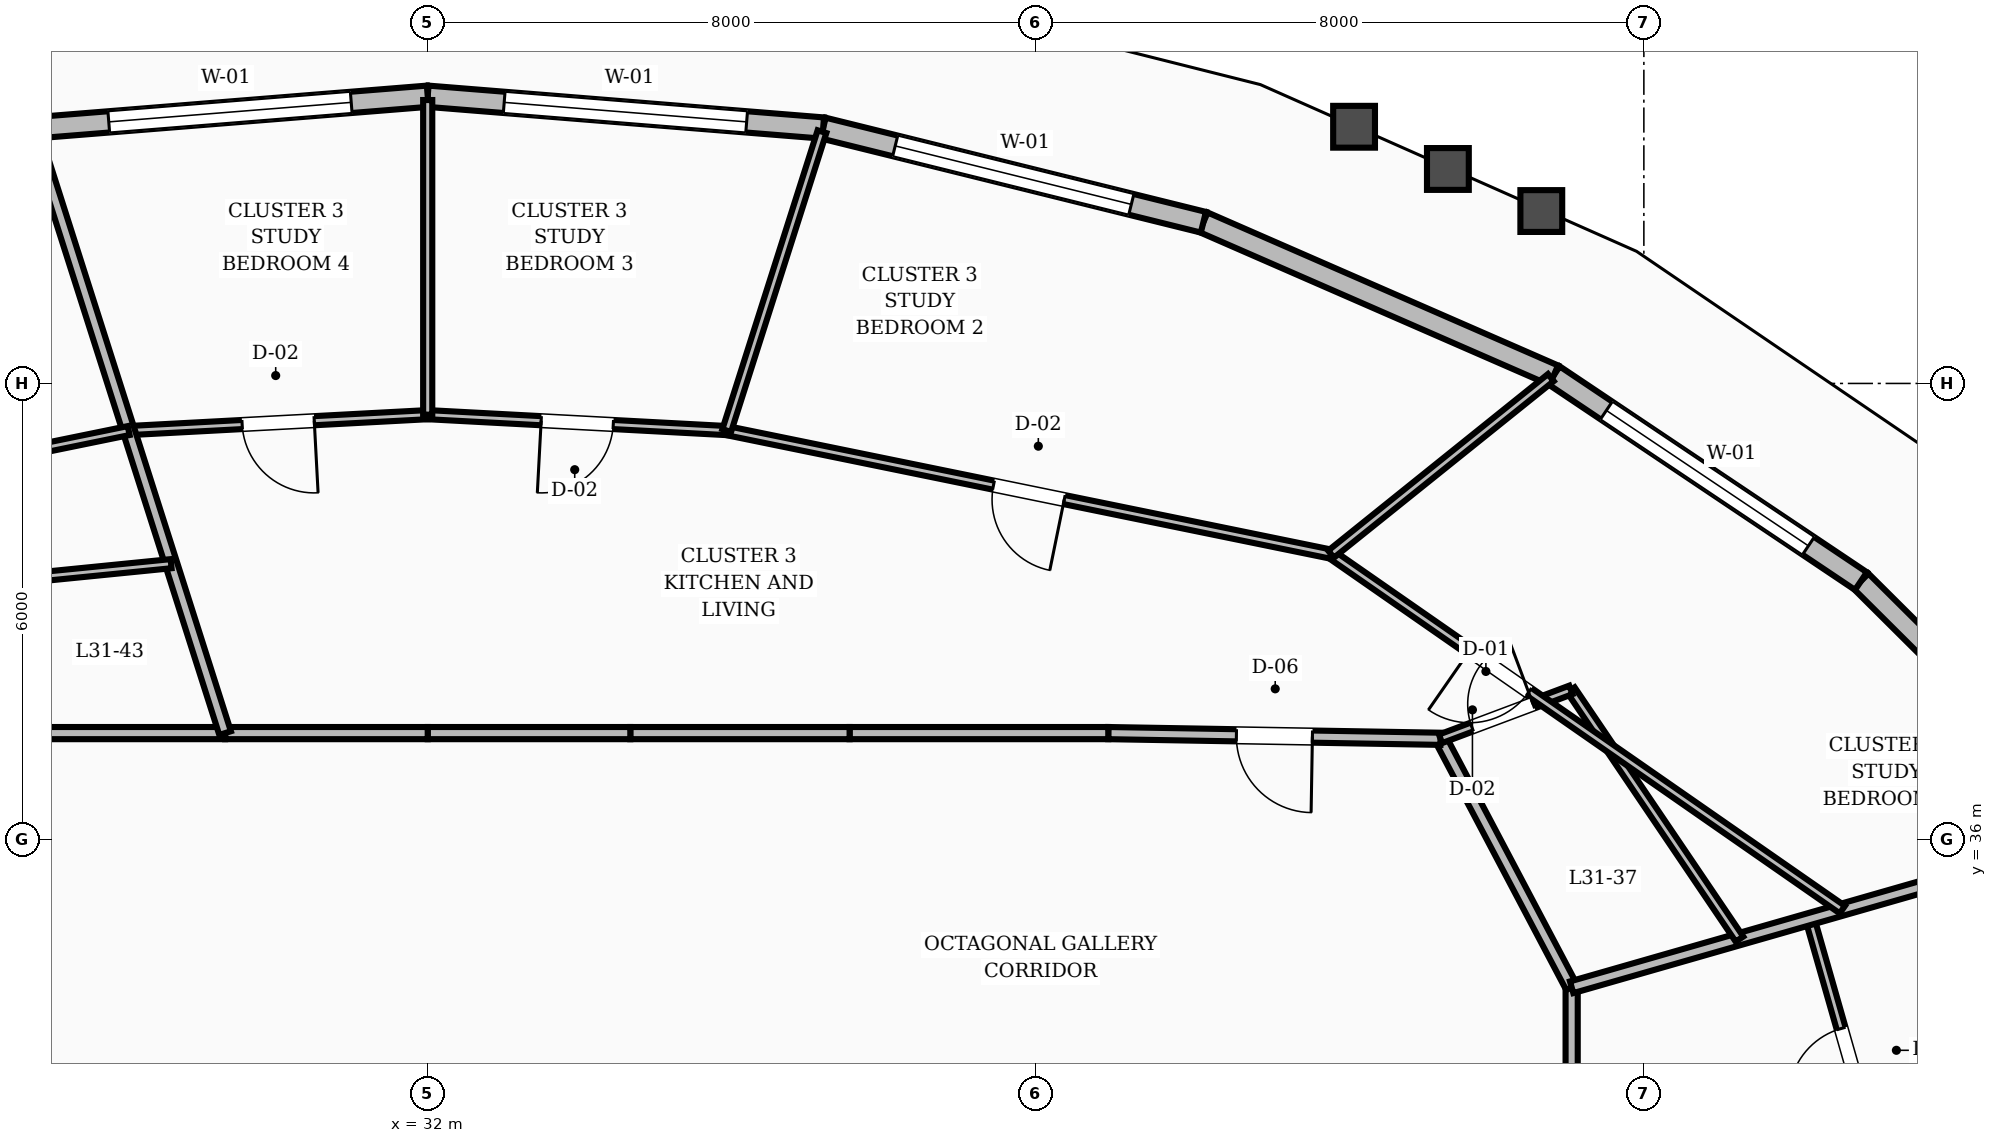
"""IFC4 building model, lengths in metres.
Left out: names, types, materials, properties, quantities, classifications, styles, units other than length and angle.
Written with IfcOpenShell. Run it as: python <this file> out.ifc"""

import sys

from ifc_helpers import new_model, si_unit, direction, frame, frame_2d, origin, place, context, subcontext, project, spatial, rectangle, extrude, element, fill, save


model = new_model("IFC4")
c1 = context("Model", 3, precision=1e-05, world=origin(), true_north=direction((0.0, 1.0)))
c2 = subcontext(c1, "Body", "Model", "MODEL_VIEW")
j1 = project(units=[si_unit("LENGTHUNIT", "METRE"), si_unit("PLANEANGLEUNIT", "RADIAN")], contexts=[c1])
p1 = place(None, origin())
s1 = spatial("IfcSite", under=j1, at=p1, CompositionType="ELEMENT")
p2 = place(p1, origin())
s2 = spatial("IfcBuilding", under=s1, at=p2, CompositionType="ELEMENT")
p3 = place(p2, frame((0.0, 0.0, 124.4)))
s3 = spatial("IfcBuildingStorey", under=s2, at=p3, CompositionType="ELEMENT", Elevation=124.4)
p4 = place(p3, frame((54.173, 36.1, 0.0), z_axis=(0.0, 0.0, 1.0), x_axis=(-0.708826657364, 0.70538271159, 0.0)))
e1 = element("IfcWall", 1, at=p4, inside=s3, PredefinedType="STANDARD", context=c2, shape_type="SweptSolid", body=[
    extrude(rectangle(XDim=4.679, YDim=0.28, at=frame_2d((2.339, 0.0))), origin(), (0.0, 0.0, 1.0), 2.82),
])
p5 = place(p3, frame((50.856, 39.4, 0.0), z_axis=(0.0, 0.0, 1.0), x_axis=(-0.83069663506, 0.556725336679, 0.0)))
e2 = element("IfcWall", 2, at=p5, inside=s3, PredefinedType="STANDARD", context=c2, shape_type="SweptSolid", body=[
    extrude(rectangle(XDim=4.865, YDim=0.28, at=frame_2d((2.432, 0.0))), origin(), (0.0, 0.0, 1.0), 2.82),
])
p6 = place(p5, frame((0.832, 0.0, 0.8)))
e3 = element("IfcOpeningElement", 3, at=p6, cuts=e2, PredefinedType="OPENING", context=c2, shape_type="SweptSolid", body=[
    extrude(rectangle(XDim=3.2, YDim=1.65, at=frame_2d((1.6, 0.825))), frame((0.0, 0.15, 0.0), z_axis=(0.0, -1.0, 0.0), x_axis=(1.0, 0.0, 0.0)), (0.0, 0.0, 1.0), 0.3),
])
p7 = place(p3, frame((46.815, 42.108, 0.0), z_axis=(0.0, 0.0, 1.0), x_axis=(-0.916473381058, 0.400095665825, 0.0)))
e4 = element("IfcWall", 4, at=p7, inside=s3, PredefinedType="STANDARD", context=c2, shape_type="SweptSolid", body=[
    extrude(rectangle(XDim=5.031, YDim=0.28, at=frame_2d((2.515, 0.0))), origin(), (0.0, 0.0, 1.0), 2.82),
])
p8 = place(p3, frame((42.205, 44.121, 0.0), z_axis=(0.0, 0.0, 1.0), x_axis=(-0.970658593631, 0.24046183608, 0.0)))
e5 = element("IfcWall", 5, at=p8, inside=s3, PredefinedType="STANDARD", context=c2, shape_type="SweptSolid", body=[
    extrude(rectangle(XDim=5.154, YDim=0.28, at=frame_2d((2.577, 0.0))), origin(), (0.0, 0.0, 1.0), 2.82),
])
p9 = place(p8, frame((0.977, 0.0, 0.8)))
e6 = element("IfcOpeningElement", 6, at=p9, cuts=e5, PredefinedType="OPENING", context=c2, shape_type="SweptSolid", body=[
    extrude(rectangle(XDim=3.2, YDim=1.65, at=frame_2d((1.6, 0.825))), frame((0.0, 0.15, 0.0), z_axis=(0.0, -1.0, 0.0), x_axis=(1.0, 0.0, 0.0)), (0.0, 0.0, 1.0), 0.3),
])
p10 = place(p3, frame((37.202, 45.36, 0.0), z_axis=(0.0, 0.0, 1.0), x_axis=(-0.996780678479, 0.080176549013, 0.0)))
e7 = element("IfcWall", 7, at=p10, inside=s3, PredefinedType="STANDARD", context=c2, shape_type="SweptSolid", body=[
    extrude(rectangle(XDim=5.219, YDim=0.28, at=frame_2d((2.61, 0.0))), origin(), (0.0, 0.0, 1.0), 2.82),
])
p11 = place(p10, frame((1.01, 0.0, 0.8)))
e8 = element("IfcOpeningElement", 8, at=p11, cuts=e7, PredefinedType="OPENING", context=c2, shape_type="SweptSolid", body=[
    extrude(rectangle(XDim=3.2, YDim=1.65, at=frame_2d((1.6, 0.825))), frame((0.0, 0.15, 0.0), z_axis=(0.0, -1.0, 0.0), x_axis=(1.0, 0.0, 0.0)), (0.0, 0.0, 1.0), 0.3),
])
p12 = place(p3, frame((32.0, 45.779, 0.0), z_axis=(0.0, 0.0, 1.0), x_axis=(-0.996780678479, -0.080176549013, 0.0)))
e9 = element("IfcWall", 9, at=p12, inside=s3, PredefinedType="STANDARD", context=c2, shape_type="SweptSolid", body=[
    extrude(rectangle(XDim=5.219, YDim=0.28, at=frame_2d((2.61, 0.0))), origin(), (0.0, 0.0, 1.0), 2.82),
])
p13 = place(p12, frame((1.01, 0.0, 0.8)))
e10 = element("IfcOpeningElement", 10, at=p13, cuts=e9, PredefinedType="OPENING", context=c2, shape_type="SweptSolid", body=[
    extrude(rectangle(XDim=3.2, YDim=1.65, at=frame_2d((1.6, 0.825))), frame((0.0, 0.15, 0.0), z_axis=(0.0, -1.0, 0.0), x_axis=(1.0, 0.0, 0.0)), (0.0, 0.0, 1.0), 0.3),
])
p14 = place(p3, frame((47.05, 30.234, 0.0), z_axis=(0.0, 0.0, 1.0), x_axis=(0.0, 1.0, 0.0)))
e11 = element("IfcWall", 11, at=p14, inside=s3, PredefinedType="SOLIDWALL", context=c2, shape_type="SweptSolid", body=[
    extrude(rectangle(XDim=3.822, YDim=0.16, at=frame_2d((1.911, 0.0))), origin(), (0.0, 0.0, 1.0), 2.8),
])
p15 = place(p3, frame((47.05, 34.056, 0.0), z_axis=(0.0, 0.0, 1.0), x_axis=(-0.466737093093, 0.884396113702, 0.0)))
e12 = element("IfcWall", 12, at=p15, inside=s3, PredefinedType="SOLIDWALL", context=c2, shape_type="SweptSolid", body=[
    extrude(rectangle(XDim=3.696, YDim=0.16, at=frame_2d((1.848, 0.0))), origin(), (0.0, 0.0, 1.0), 2.8),
])
p16 = place(p3, frame((45.325, 37.325, 0.0), z_axis=(0.0, 0.0, 1.0), x_axis=(-0.999853038912, 0.017143528788, 0.0)))
e13 = element("IfcWall", 13, at=p16, inside=s3, PredefinedType="SOLIDWALL", context=c2, shape_type="SweptSolid", body=[
    extrude(rectangle(XDim=4.372, YDim=0.16, at=frame_2d((2.186, 0.0))), origin(), (0.0, 0.0, 1.0), 2.8),
])
p17 = place(p16, frame((1.686, 0.0, 0.0)))
e14 = element("IfcOpeningElement", 14, at=p17, cuts=e13, PredefinedType="OPENING", context=c2, shape_type="SweptSolid", body=[
    extrude(rectangle(XDim=1.0, YDim=2.1, at=frame_2d((0.5, 1.05))), frame((0.0, 0.09, 0.0), z_axis=(0.0, -1.0, 0.0), x_axis=(1.0, 0.0, 0.0)), (0.0, 0.0, 1.0), 0.18),
])
p18 = place(p3, frame((40.954, 37.4, 0.0), z_axis=(0.0, 0.0, 1.0), x_axis=(-1.0, 0.0, 0.0)))
e15 = element("IfcWall", 15, at=p18, inside=s3, PredefinedType="SOLIDWALL", context=c2, shape_type="SweptSolid", body=[
    extrude(rectangle(XDim=3.403, YDim=0.16, at=frame_2d((1.702, 0.0))), origin(), (0.0, 0.0, 1.0), 2.8),
])
p19 = place(p3, frame((37.551, 37.4, 0.0), z_axis=(0.0, 0.0, 1.0), x_axis=(-1.0, 0.0, 0.0)))
e16 = element("IfcWall", 16, at=p19, inside=s3, PredefinedType="SOLIDWALL", context=c2, shape_type="SweptSolid", body=[
    extrude(rectangle(XDim=2.885, YDim=0.16, at=frame_2d((1.443, 0.0))), origin(), (0.0, 0.0, 1.0), 2.8),
])
for number, where, z_axis, x_axis in (
    (17, (34.665, 37.4, 0.0), (0.0, 0.0, 1.0), (-1.0, 0.0, 0.0)),
    (18, (32.0, 37.4, 0.0), (0.0, 0.0, 1.0), (-1.0, 0.0, 0.0)),
):
    element("IfcWall", number, at=place(p3, frame(where, z_axis=z_axis, x_axis=x_axis)), inside=s3, PredefinedType="SOLIDWALL", context=c2, shape_type="SweptSolid", body=[
        extrude(rectangle(XDim=2.665, YDim=0.16, at=frame_2d((1.333, 0.0))), origin(), (0.0, 0.0, 1.0), 2.8),
    ])
p20 = place(p3, frame((29.335, 37.4, 0.0), z_axis=(0.0, 0.0, 1.0), x_axis=(-1.0, 0.0, 0.0)))
e19 = element("IfcWall", 19, at=p20, inside=s3, PredefinedType="SOLIDWALL", context=c2, shape_type="SweptSolid", body=[
    extrude(rectangle(XDim=2.885, YDim=0.16, at=frame_2d((1.443, 0.0))), origin(), (0.0, 0.0, 1.0), 2.8),
])
p21 = place(p3, frame((51.268, 31.158, 0.0), z_axis=(0.0, 0.0, 1.0), x_axis=(-0.274582301576, 0.961563601465, 0.0)))
e20 = element("IfcWall", 20, at=p21, inside=s3, PredefinedType="PARTITIONING", context=c2, shape_type="SweptSolid", body=[
    extrude(rectangle(XDim=3.949, YDim=0.12, at=frame_2d((1.974, 0.0))), origin(), (0.0, 0.0, 1.0), 2.8),
])
p22 = place(p21, frame((1.5, 0.0, 0.0)))
e21 = element("IfcOpeningElement", 21, at=p22, cuts=e20, PredefinedType="OPENING", context=c2, shape_type="SweptSolid", body=[
    extrude(rectangle(XDim=0.95, YDim=2.1, at=frame_2d((0.475, 1.05))), frame((0.0, 0.07, 0.0), z_axis=(0.0, -1.0, 0.0), x_axis=(1.0, 0.0, 0.0)), (0.0, 0.0, 1.0), 0.14),
])
p23 = place(p3, frame((47.05, 34.056, 0.0), z_axis=(0.0, 0.0, 1.0), x_axis=(0.96122671613, 0.275759315705, 0.0)))
e22 = element("IfcWall", 22, at=p23, inside=s3, PredefinedType="SOLIDWALL", context=c2, shape_type="SweptSolid", body=[
    extrude(rectangle(XDim=7.36, YDim=0.16, at=frame_2d((3.68, 0.0))), origin(), (0.0, 0.0, 1.0), 2.8),
])
p24 = place(p3, frame((49.258, 34.69, 0.0), z_axis=(0.0, 0.0, 1.0), x_axis=(-0.560422606551, 0.828206799095, 0.0)))
e23 = element("IfcWall", 23, at=p24, inside=s3, PredefinedType="PARTITIONING", context=c2, shape_type="SweptSolid", body=[
    extrude(rectangle(XDim=3.959, YDim=0.12, at=frame_2d((1.979, 0.0))), origin(), (0.0, 0.0, 1.0), 2.8),
])
p25 = place(p3, frame((45.325, 37.325, 0.0), z_axis=(0.0, 0.0, 1.0), x_axis=(0.936268898243, 0.351284144507, 0.0)))
e24 = element("IfcWall", 24, at=p25, inside=s3, PredefinedType="PARTITIONING", context=c2, shape_type="SweptSolid", body=[
    extrude(rectangle(XDim=1.831, YDim=0.12, at=frame_2d((0.916, 0.0))), origin(), (0.0, 0.0, 1.0), 2.8),
])
p26 = place(p25, frame((0.44, 0.0, 0.0)))
e25 = element("IfcOpeningElement", 25, at=p26, cuts=e24, PredefinedType="OPENING", context=c2, shape_type="SweptSolid", body=[
    extrude(rectangle(XDim=0.86, YDim=2.1, at=frame_2d((0.43, 1.05))), frame((0.0, 0.07, 0.0), z_axis=(0.0, -1.0, 0.0), x_axis=(1.0, 0.0, 0.0)), (0.0, 0.0, 1.0), 0.14),
])
p27 = place(p3, frame((50.611, 35.078, 0.0), z_axis=(0.0, 0.0, 1.0), x_axis=(-0.821081312211, 0.570811246156, 0.0)))
e26 = element("IfcWall", 26, at=p27, inside=s3, PredefinedType="PARTITIONING", context=c2, shape_type="SweptSolid", body=[
    extrude(rectangle(XDim=8.192, YDim=0.12, at=frame_2d((4.096, 0.0))), origin(), (0.0, 0.0, 1.0), 2.8),
])
p28 = place(p27, frame((5.021, 0.0, 0.0)))
e27 = element("IfcOpeningElement", 27, at=p28, cuts=e26, PredefinedType="OPENING", context=c2, shape_type="SweptSolid", body=[
    extrude(rectangle(XDim=0.95, YDim=2.1, at=frame_2d((0.475, 1.05))), frame((0.0, 0.07, 0.0), z_axis=(0.0, -1.0, 0.0), x_axis=(1.0, 0.0, 0.0)), (0.0, 0.0, 1.0), 0.14),
])
p29 = place(p3, frame((43.885, 39.754, 0.0), z_axis=(0.0, 0.0, 1.0), x_axis=(-0.979728085565, 0.200331920462, 0.0)))
e28 = element("IfcWall", 28, at=p29, inside=s3, PredefinedType="PARTITIONING", context=c2, shape_type="SweptSolid", body=[
    extrude(rectangle(XDim=8.115, YDim=0.12, at=frame_2d((4.058, 0.0))), origin(), (0.0, 0.0, 1.0), 2.8),
])
p30 = place(p29, frame((3.583, 0.0, 0.0)))
e29 = element("IfcOpeningElement", 29, at=p30, cuts=e28, PredefinedType="OPENING", context=c2, shape_type="SweptSolid", body=[
    extrude(rectangle(XDim=0.95, YDim=2.1, at=frame_2d((0.475, 1.05))), frame((0.0, 0.07, 0.0), z_axis=(0.0, -1.0, 0.0), x_axis=(1.0, 0.0, 0.0)), (0.0, 0.0, 1.0), 0.14),
])
p31 = place(p3, frame((43.885, 39.754, 0.0), z_axis=(0.0, 0.0, 1.0), x_axis=(0.779621413821, 0.626251108671, 0.0)))
e30 = element("IfcWall", 30, at=p31, inside=s3, PredefinedType="PARTITIONING", context=c2, shape_type="SweptSolid", body=[
    extrude(rectangle(XDim=3.709, YDim=0.12, at=frame_2d((1.854, 0.0))), origin(), (0.0, 0.0, 1.0), 2.8),
])
p32 = place(p3, frame((35.934, 41.38, 0.0), z_axis=(0.0, 0.0, 1.0), x_axis=(-0.998585283564, 0.0531735973, 0.0)))
e31 = element("IfcWall", 31, at=p32, inside=s3, PredefinedType="PARTITIONING", context=c2, shape_type="SweptSolid", body=[
    extrude(rectangle(XDim=3.939, YDim=0.12, at=frame_2d((1.97, 0.0))), origin(), (0.0, 0.0, 1.0), 2.8),
])
p33 = place(p32, frame((1.495, 0.0, 0.0)))
e32 = element("IfcOpeningElement", 32, at=p33, cuts=e31, PredefinedType="OPENING", context=c2, shape_type="SweptSolid", body=[
    extrude(rectangle(XDim=0.95, YDim=2.1, at=frame_2d((0.475, 1.05))), frame((0.0, 0.07, 0.0), z_axis=(0.0, -1.0, 0.0), x_axis=(1.0, 0.0, 0.0)), (0.0, 0.0, 1.0), 0.14),
])
p34 = place(p3, frame((35.934, 41.38, 0.0), z_axis=(0.0, 0.0, 1.0), x_axis=(0.30367237582, 0.95277651533, 0.0)))
e33 = element("IfcWall", 33, at=p34, inside=s3, PredefinedType="PARTITIONING", context=c2, shape_type="SweptSolid", body=[
    extrude(rectangle(XDim=4.127, YDim=0.12, at=frame_2d((2.064, 0.0))), origin(), (0.0, 0.0, 1.0), 2.8),
])
p35 = place(p3, frame((32.0, 41.589, 0.0), z_axis=(0.0, 0.0, 1.0), x_axis=(-0.998585283564, -0.0531735973, 0.0)))
e34 = element("IfcWall", 34, at=p35, inside=s3, PredefinedType="PARTITIONING", context=c2, shape_type="SweptSolid", body=[
    extrude(rectangle(XDim=3.939, YDim=0.12, at=frame_2d((1.97, 0.0))), origin(), (0.0, 0.0, 1.0), 2.8),
])
p36 = place(p35, frame((1.495, 0.0, 0.0)))
e35 = element("IfcOpeningElement", 35, at=p36, cuts=e34, PredefinedType="OPENING", context=c2, shape_type="SweptSolid", body=[
    extrude(rectangle(XDim=0.95, YDim=2.1, at=frame_2d((0.475, 1.05))), frame((0.0, 0.07, 0.0), z_axis=(0.0, -1.0, 0.0), x_axis=(1.0, 0.0, 0.0)), (0.0, 0.0, 1.0), 0.14),
])
p37 = place(p3, frame((32.0, 41.589, 0.0), z_axis=(0.0, 0.0, 1.0), x_axis=(0.0, 1.0, 0.0)))
e36 = element("IfcWall", 36, at=p37, inside=s3, PredefinedType="PARTITIONING", context=c2, shape_type="SweptSolid", body=[
    extrude(rectangle(XDim=4.139, YDim=0.12, at=frame_2d((2.07, 0.0))), origin(), (0.0, 0.0, 1.0), 2.8),
])
p38 = place(p3, frame((29.335, 37.4, 0.0), z_axis=(0.0, 0.0, 1.0), x_axis=(-0.303676848988, 0.952775089614, 0.0)))
e37 = element("IfcWall", 37, at=p38, inside=s3, PredefinedType="SOLIDWALL", context=c2, shape_type="SweptSolid", body=[
    extrude(rectangle(XDim=8.305, YDim=0.16, at=frame_2d((4.152, 0.0))), origin(), (0.0, 0.0, 1.0), 2.8),
])
p39 = place(p3, frame((28.624, 39.629, 0.0), z_axis=(0.0, 0.0, 1.0), x_axis=(-0.995055154647, -0.099323910565, 0.0)))
e38 = element("IfcWall", 38, at=p39, inside=s3, PredefinedType="PARTITIONING", context=c2, shape_type="SweptSolid", body=[
    extrude(rectangle(XDim=3.495, YDim=0.12, at=frame_2d((1.748, 0.0))), origin(), (0.0, 0.0, 1.0), 2.8),
])
p40 = place(p3, frame((28.066, 41.38, 0.0), z_axis=(0.0, 0.0, 1.0), x_axis=(-0.979728085565, -0.200331920462, 0.0)))
e39 = element("IfcWall", 39, at=p40, inside=s3, PredefinedType="PARTITIONING", context=c2, shape_type="SweptSolid", body=[
    extrude(rectangle(XDim=8.115, YDim=0.12, at=frame_2d((4.058, 0.0))), origin(), (0.0, 0.0, 1.0), 2.8),
])
p41 = place(p40, frame((4.965, 0.0, 0.0)))
e40 = element("IfcOpeningElement", 40, at=p41, cuts=e39, PredefinedType="OPENING", context=c2, shape_type="SweptSolid", body=[
    extrude(rectangle(XDim=0.95, YDim=2.1, at=frame_2d((0.475, 1.05))), frame((0.0, 0.07, 0.0), z_axis=(0.0, -1.0, 0.0), x_axis=(1.0, 0.0, 0.0)), (0.0, 0.0, 1.0), 0.14),
])
p42 = place(p6, origin())
e41 = element("IfcWindow", 41, at=p42, inside=s3, PartitioningType="SINGLE_PANEL", PredefinedType="WINDOW", context=c2, shape_type="SweptSolid", body=[
    extrude(rectangle(XDim=3.2, YDim=1.65, at=frame_2d((1.6, 0.825))), frame((0.0, 0.03, 0.0), z_axis=(0.0, -1.0, 0.0), x_axis=(1.0, 0.0, 0.0)), (0.0, 0.0, 1.0), 0.06),
])
fill(e3, e41)
p43 = place(p9, origin())
e42 = element("IfcWindow", 42, at=p43, inside=s3, PartitioningType="SINGLE_PANEL", PredefinedType="WINDOW", context=c2, shape_type="SweptSolid", body=[
    extrude(rectangle(XDim=3.2, YDim=1.65, at=frame_2d((1.6, 0.825))), frame((0.0, 0.03, 0.0), z_axis=(0.0, -1.0, 0.0), x_axis=(1.0, 0.0, 0.0)), (0.0, 0.0, 1.0), 0.06),
])
fill(e6, e42)
p44 = place(p11, origin())
e43 = element("IfcWindow", 43, at=p44, inside=s3, PartitioningType="SINGLE_PANEL", PredefinedType="WINDOW", context=c2, shape_type="SweptSolid", body=[
    extrude(rectangle(XDim=3.2, YDim=1.65, at=frame_2d((1.6, 0.825))), frame((0.0, 0.03, 0.0), z_axis=(0.0, -1.0, 0.0), x_axis=(1.0, 0.0, 0.0)), (0.0, 0.0, 1.0), 0.06),
])
fill(e8, e43)
p45 = place(p13, origin())
e44 = element("IfcWindow", 44, at=p45, inside=s3, PartitioningType="SINGLE_PANEL", PredefinedType="WINDOW", context=c2, shape_type="SweptSolid", body=[
    extrude(rectangle(XDim=3.2, YDim=1.65, at=frame_2d((1.6, 0.825))), frame((0.0, 0.03, 0.0), z_axis=(0.0, -1.0, 0.0), x_axis=(1.0, 0.0, 0.0)), (0.0, 0.0, 1.0), 0.06),
])
fill(e10, e44)
p46 = place(p22, origin())
e45 = element("IfcDoor", 45, at=p46, inside=s3, OperationType="SINGLE_SWING_LEFT", PredefinedType="DOOR", context=c2, shape_type="SweptSolid", body=[
    extrude(rectangle(XDim=0.95, YDim=2.1, at=frame_2d((0.475, 1.05))), frame((0.0, 0.025, 0.0), z_axis=(0.0, -1.0, 0.0), x_axis=(1.0, 0.0, 0.0)), (0.0, 0.0, 1.0), 0.05),
])
fill(e21, e45)
p47 = place(p26, origin())
e46 = element("IfcDoor", 46, at=p47, inside=s3, OperationType="SINGLE_SWING_RIGHT", PredefinedType="DOOR", context=c2, shape_type="SweptSolid", body=[
    extrude(rectangle(XDim=0.86, YDim=2.1, at=frame_2d((0.43, 1.05))), frame((0.0, 0.025, 0.0), z_axis=(0.0, -1.0, 0.0), x_axis=(1.0, 0.0, 0.0)), (0.0, 0.0, 1.0), 0.05),
])
fill(e25, e46)
p48 = place(p17, origin())
e47 = element("IfcDoor", 47, at=p48, inside=s3, OperationType="SINGLE_SWING_LEFT", PredefinedType="DOOR", context=c2, shape_type="SweptSolid", body=[
    extrude(rectangle(XDim=1.0, YDim=2.1, at=frame_2d((0.5, 1.05))), frame((0.0, 0.025, 0.0), z_axis=(0.0, -1.0, 0.0), x_axis=(1.0, 0.0, 0.0)), (0.0, 0.0, 1.0), 0.05),
])
fill(e14, e47)
p49 = place(p28, origin())
e48 = element("IfcDoor", 48, at=p49, inside=s3, OperationType="SINGLE_SWING_RIGHT", PredefinedType="DOOR", context=c2, shape_type="SweptSolid", body=[
    extrude(rectangle(XDim=0.95, YDim=2.1, at=frame_2d((0.475, 1.05))), frame((0.0, 0.025, 0.0), z_axis=(0.0, -1.0, 0.0), x_axis=(1.0, 0.0, 0.0)), (0.0, 0.0, 1.0), 0.05),
])
fill(e27, e48)
p50 = place(p30, origin())
e49 = element("IfcDoor", 49, at=p50, inside=s3, OperationType="SINGLE_SWING_LEFT", PredefinedType="DOOR", context=c2, shape_type="SweptSolid", body=[
    extrude(rectangle(XDim=0.95, YDim=2.1, at=frame_2d((0.475, 1.05))), frame((0.0, 0.025, 0.0), z_axis=(0.0, -1.0, 0.0), x_axis=(1.0, 0.0, 0.0)), (0.0, 0.0, 1.0), 0.05),
])
fill(e29, e49)
p51 = place(p33, origin())
e50 = element("IfcDoor", 50, at=p51, inside=s3, OperationType="SINGLE_SWING_RIGHT", PredefinedType="DOOR", context=c2, shape_type="SweptSolid", body=[
    extrude(rectangle(XDim=0.95, YDim=2.1, at=frame_2d((0.475, 1.05))), frame((0.0, 0.025, 0.0), z_axis=(0.0, -1.0, 0.0), x_axis=(1.0, 0.0, 0.0)), (0.0, 0.0, 1.0), 0.05),
])
fill(e32, e50)
p52 = place(p36, origin())
e51 = element("IfcDoor", 51, at=p52, inside=s3, OperationType="SINGLE_SWING_LEFT", PredefinedType="DOOR", context=c2, shape_type="SweptSolid", body=[
    extrude(rectangle(XDim=0.95, YDim=2.1, at=frame_2d((0.475, 1.05))), frame((0.0, 0.025, 0.0), z_axis=(0.0, -1.0, 0.0), x_axis=(1.0, 0.0, 0.0)), (0.0, 0.0, 1.0), 0.05),
])
fill(e35, e51)
save(model, sys.argv[1])
